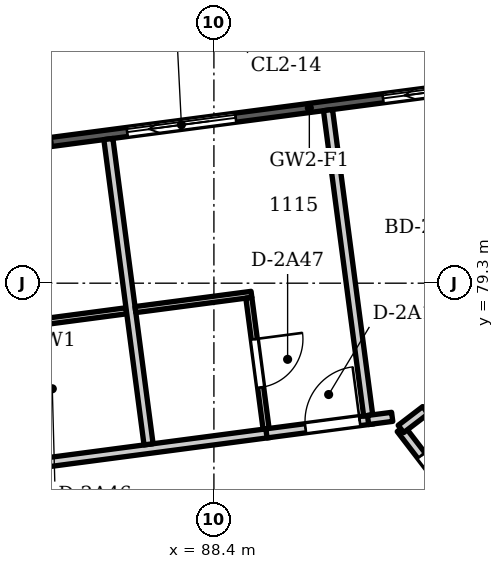
"""IFC4 building model, lengths in metres.
Left out: names, types, materials, properties, quantities, classifications, styles, units other than length and angle.
Written with IfcOpenShell. Run it as: python <this file> out.ifc"""

import sys

from ifc_helpers import new_model, si_unit, direction, frame, frame_2d, origin, place, context, subcontext, project, spatial, polyline, rectangle, outline, extrude, element, fill, save


model = new_model("IFC4")
c1 = context("Model", 3, precision=1e-05, world=origin(), true_north=direction((0.0, 1.0)))
c2 = subcontext(c1, "Body", "Model", "MODEL_VIEW")
j1 = project(units=[si_unit("LENGTHUNIT", "METRE"), si_unit("PLANEANGLEUNIT", "RADIAN")], contexts=[c1])
p1 = place(None, origin())
s1 = spatial("IfcSite", under=j1, at=p1, CompositionType="ELEMENT")
p2 = place(p1, origin())
s2 = spatial("IfcBuilding", under=s1, at=p2, CompositionType="ELEMENT")
p3 = place(p2, frame((0.0, 0.0, 50.4)))
s3 = spatial("IfcBuildingStorey", under=s2, at=p3, CompositionType="ELEMENT", Elevation=50.4)
p4 = place(p3, frame((54.142, 77.465, 0.0), z_axis=(0.0, 0.0, 1.0), x_axis=(0.991444696532, 0.130527444308, 0.0)))
e1 = element("IfcWall", 1, at=p4, inside=s3, PredefinedType="SOLIDWALL", context=c2, shape_type="SweptSolid", body=[
    extrude(outline(polyline([(0.149, 0.075), (0.149, -0.075), (47.217, -0.075), (47.217, 0.075), (0.149, 0.075)])), origin(), (0.0, 0.0, 1.0), 3.3),
])
p5 = place(p4, frame((1.222, 0.0, 0.0)))
e2 = element("IfcOpeningElement", 2, at=p5, cuts=e1, PredefinedType="OPENING", context=c2, shape_type="SweptSolid", body=[
    extrude(rectangle(XDim=1.8, YDim=2.6, at=frame_2d((0.9, 1.3))), frame((0.0, 0.085, 0.0), z_axis=(0.0, -1.0, 0.0), x_axis=(1.0, 0.0, 0.0)), (0.0, 0.0, 1.0), 0.17),
])
p6 = place(p4, frame((4.565, 0.0, 0.0)))
e3 = element("IfcOpeningElement", 3, at=p6, cuts=e1, PredefinedType="OPENING", context=c2, shape_type="SweptSolid", body=[
    extrude(rectangle(XDim=1.8, YDim=2.6, at=frame_2d((0.9, 1.3))), frame((0.0, 0.085, 0.0), z_axis=(0.0, -1.0, 0.0), x_axis=(1.0, 0.0, 0.0)), (0.0, 0.0, 1.0), 0.17),
])
p7 = place(p4, frame((8.209, 0.0, 0.0)))
e4 = element("IfcOpeningElement", 4, at=p7, cuts=e1, PredefinedType="OPENING", context=c2, shape_type="SweptSolid", body=[
    extrude(rectangle(XDim=1.8, YDim=2.6, at=frame_2d((0.9, 1.3))), frame((0.0, 0.085, 0.0), z_axis=(0.0, -1.0, 0.0), x_axis=(1.0, 0.0, 0.0)), (0.0, 0.0, 1.0), 0.17),
])
p8 = place(p4, frame((12.453, 0.0, 0.0)))
e5 = element("IfcOpeningElement", 5, at=p8, cuts=e1, PredefinedType="OPENING", context=c2, shape_type="SweptSolid", body=[
    extrude(rectangle(XDim=1.8, YDim=2.6, at=frame_2d((0.9, 1.3))), frame((0.0, 0.085, 0.0), z_axis=(0.0, -1.0, 0.0), x_axis=(1.0, 0.0, 0.0)), (0.0, 0.0, 1.0), 0.17),
])
p9 = place(p4, frame((15.496, 0.0, 0.0)))
e6 = element("IfcOpeningElement", 6, at=p9, cuts=e1, PredefinedType="OPENING", context=c2, shape_type="SweptSolid", body=[
    extrude(rectangle(XDim=1.8, YDim=2.6, at=frame_2d((0.9, 1.3))), frame((0.0, 0.085, 0.0), z_axis=(0.0, -1.0, 0.0), x_axis=(1.0, 0.0, 0.0)), (0.0, 0.0, 1.0), 0.17),
])
p10 = place(p4, frame((18.84, 0.0, 0.15)))
e7 = element("IfcOpeningElement", 7, at=p10, cuts=e1, PredefinedType="OPENING", context=c2, shape_type="SweptSolid", body=[
    extrude(rectangle(XDim=2.4, YDim=2.45, at=frame_2d((1.2, 1.225))), frame((0.0, 0.085, 0.0), z_axis=(0.0, -1.0, 0.0), x_axis=(1.0, 0.0, 0.0)), (0.0, 0.0, 1.0), 0.17),
])
p11 = place(p4, frame((22.783, 0.0, 0.0)))
e8 = element("IfcOpeningElement", 8, at=p11, cuts=e1, PredefinedType="OPENING", context=c2, shape_type="SweptSolid", body=[
    extrude(rectangle(XDim=1.8, YDim=2.6, at=frame_2d((0.9, 1.3))), frame((0.0, 0.085, 0.0), z_axis=(0.0, -1.0, 0.0), x_axis=(1.0, 0.0, 0.0)), (0.0, 0.0, 1.0), 0.17),
])
p12 = place(p4, frame((26.127, 0.0, 0.15)))
e9 = element("IfcOpeningElement", 9, at=p12, cuts=e1, PredefinedType="OPENING", context=c2, shape_type="SweptSolid", body=[
    extrude(rectangle(XDim=2.4, YDim=2.45, at=frame_2d((1.2, 1.225))), frame((0.0, 0.085, 0.0), z_axis=(0.0, -1.0, 0.0), x_axis=(1.0, 0.0, 0.0)), (0.0, 0.0, 1.0), 0.17),
])
p13 = place(p4, frame((30.071, 0.0, 0.0)))
e10 = element("IfcOpeningElement", 10, at=p13, cuts=e1, PredefinedType="OPENING", context=c2, shape_type="SweptSolid", body=[
    extrude(rectangle(XDim=1.8, YDim=2.6, at=frame_2d((0.9, 1.3))), frame((0.0, 0.085, 0.0), z_axis=(0.0, -1.0, 0.0), x_axis=(1.0, 0.0, 0.0)), (0.0, 0.0, 1.0), 0.17),
])
p14 = place(p4, frame((33.114, 0.0, 0.0)))
e11 = element("IfcOpeningElement", 11, at=p14, cuts=e1, PredefinedType="OPENING", context=c2, shape_type="SweptSolid", body=[
    extrude(rectangle(XDim=1.8, YDim=2.6, at=frame_2d((0.9, 1.3))), frame((0.0, 0.085, 0.0), z_axis=(0.0, -1.0, 0.0), x_axis=(1.0, 0.0, 0.0)), (0.0, 0.0, 1.0), 0.17),
])
p15 = place(p4, frame((37.358, 0.0, 0.0)))
e12 = element("IfcOpeningElement", 12, at=p15, cuts=e1, PredefinedType="OPENING", context=c2, shape_type="SweptSolid", body=[
    extrude(rectangle(XDim=1.8, YDim=2.6, at=frame_2d((0.9, 1.3))), frame((0.0, 0.085, 0.0), z_axis=(0.0, -1.0, 0.0), x_axis=(1.0, 0.0, 0.0)), (0.0, 0.0, 1.0), 0.17),
])
p16 = place(p4, frame((41.001, 0.0, 0.0)))
e13 = element("IfcOpeningElement", 13, at=p16, cuts=e1, PredefinedType="OPENING", context=c2, shape_type="SweptSolid", body=[
    extrude(rectangle(XDim=1.8, YDim=2.6, at=frame_2d((0.9, 1.3))), frame((0.0, 0.085, 0.0), z_axis=(0.0, -1.0, 0.0), x_axis=(1.0, 0.0, 0.0)), (0.0, 0.0, 1.0), 0.17),
])
p17 = place(p4, frame((44.345, 0.0, 0.0)))
e14 = element("IfcOpeningElement", 14, at=p17, cuts=e1, PredefinedType="OPENING", context=c2, shape_type="SweptSolid", body=[
    extrude(rectangle(XDim=1.8, YDim=2.6, at=frame_2d((0.9, 1.3))), frame((0.0, 0.085, 0.0), z_axis=(0.0, -1.0, 0.0), x_axis=(1.0, 0.0, 0.0)), (0.0, 0.0, 1.0), 0.17),
])
p18 = place(p3, frame((105.889, 77.411, 0.0), z_axis=(0.0, 0.0, 1.0), x_axis=(-0.38268395344, -0.923879316675, 0.0)))
e15 = element("IfcWall", 15, at=p18, inside=s3, PredefinedType="SOLIDWALL", context=c2, shape_type="SweptSolid", body=[
    extrude(outline(polyline([(0.149, 0.075), (0.149, -0.075), (47.217, -0.075), (47.217, 0.075), (0.149, 0.075)])), origin(), (0.0, 0.0, 1.0), 3.3),
])
p19 = place(p18, frame((1.222, 0.0, 0.0)))
e16 = element("IfcOpeningElement", 16, at=p19, cuts=e15, PredefinedType="OPENING", context=c2, shape_type="SweptSolid", body=[
    extrude(rectangle(XDim=1.8, YDim=2.6, at=frame_2d((0.9, 1.3))), frame((0.0, 0.085, 0.0), z_axis=(0.0, -1.0, 0.0), x_axis=(1.0, 0.0, 0.0)), (0.0, 0.0, 1.0), 0.17),
])
p20 = place(p18, frame((4.565, 0.0, 0.0)))
e17 = element("IfcOpeningElement", 17, at=p20, cuts=e15, PredefinedType="OPENING", context=c2, shape_type="SweptSolid", body=[
    extrude(rectangle(XDim=1.8, YDim=2.6, at=frame_2d((0.9, 1.3))), frame((0.0, 0.085, 0.0), z_axis=(0.0, -1.0, 0.0), x_axis=(1.0, 0.0, 0.0)), (0.0, 0.0, 1.0), 0.17),
])
p21 = place(p18, frame((8.209, 0.0, 0.0)))
e18 = element("IfcOpeningElement", 18, at=p21, cuts=e15, PredefinedType="OPENING", context=c2, shape_type="SweptSolid", body=[
    extrude(rectangle(XDim=1.8, YDim=2.6, at=frame_2d((0.9, 1.3))), frame((0.0, 0.085, 0.0), z_axis=(0.0, -1.0, 0.0), x_axis=(1.0, 0.0, 0.0)), (0.0, 0.0, 1.0), 0.17),
])
p22 = place(p18, frame((12.453, 0.0, 0.0)))
e19 = element("IfcOpeningElement", 19, at=p22, cuts=e15, PredefinedType="OPENING", context=c2, shape_type="SweptSolid", body=[
    extrude(rectangle(XDim=1.8, YDim=2.6, at=frame_2d((0.9, 1.3))), frame((0.0, 0.085, 0.0), z_axis=(0.0, -1.0, 0.0), x_axis=(1.0, 0.0, 0.0)), (0.0, 0.0, 1.0), 0.17),
])
p23 = place(p18, frame((15.496, 0.0, 0.0)))
e20 = element("IfcOpeningElement", 20, at=p23, cuts=e15, PredefinedType="OPENING", context=c2, shape_type="SweptSolid", body=[
    extrude(rectangle(XDim=1.8, YDim=2.6, at=frame_2d((0.9, 1.3))), frame((0.0, 0.085, 0.0), z_axis=(0.0, -1.0, 0.0), x_axis=(1.0, 0.0, 0.0)), (0.0, 0.0, 1.0), 0.17),
])
p24 = place(p18, frame((18.84, 0.0, 0.15)))
e21 = element("IfcOpeningElement", 21, at=p24, cuts=e15, PredefinedType="OPENING", context=c2, shape_type="SweptSolid", body=[
    extrude(rectangle(XDim=2.4, YDim=2.45, at=frame_2d((1.2, 1.225))), frame((0.0, 0.085, 0.0), z_axis=(0.0, -1.0, 0.0), x_axis=(1.0, 0.0, 0.0)), (0.0, 0.0, 1.0), 0.17),
])
p25 = place(p18, frame((22.783, 0.0, 0.0)))
e22 = element("IfcOpeningElement", 22, at=p25, cuts=e15, PredefinedType="OPENING", context=c2, shape_type="SweptSolid", body=[
    extrude(rectangle(XDim=1.8, YDim=2.6, at=frame_2d((0.9, 1.3))), frame((0.0, 0.085, 0.0), z_axis=(0.0, -1.0, 0.0), x_axis=(1.0, 0.0, 0.0)), (0.0, 0.0, 1.0), 0.17),
])
p26 = place(p18, frame((26.127, 0.0, 0.15)))
e23 = element("IfcOpeningElement", 23, at=p26, cuts=e15, PredefinedType="OPENING", context=c2, shape_type="SweptSolid", body=[
    extrude(rectangle(XDim=2.4, YDim=2.45, at=frame_2d((1.2, 1.225))), frame((0.0, 0.085, 0.0), z_axis=(0.0, -1.0, 0.0), x_axis=(1.0, 0.0, 0.0)), (0.0, 0.0, 1.0), 0.17),
])
p27 = place(p18, frame((30.071, 0.0, 0.0)))
e24 = element("IfcOpeningElement", 24, at=p27, cuts=e15, PredefinedType="OPENING", context=c2, shape_type="SweptSolid", body=[
    extrude(rectangle(XDim=1.8, YDim=2.6, at=frame_2d((0.9, 1.3))), frame((0.0, 0.085, 0.0), z_axis=(0.0, -1.0, 0.0), x_axis=(1.0, 0.0, 0.0)), (0.0, 0.0, 1.0), 0.17),
])
p28 = place(p18, frame((33.114, 0.0, 0.0)))
e25 = element("IfcOpeningElement", 25, at=p28, cuts=e15, PredefinedType="OPENING", context=c2, shape_type="SweptSolid", body=[
    extrude(rectangle(XDim=1.8, YDim=2.6, at=frame_2d((0.9, 1.3))), frame((0.0, 0.085, 0.0), z_axis=(0.0, -1.0, 0.0), x_axis=(1.0, 0.0, 0.0)), (0.0, 0.0, 1.0), 0.17),
])
p29 = place(p18, frame((37.358, 0.0, 0.0)))
e26 = element("IfcOpeningElement", 26, at=p29, cuts=e15, PredefinedType="OPENING", context=c2, shape_type="SweptSolid", body=[
    extrude(rectangle(XDim=1.8, YDim=2.6, at=frame_2d((0.9, 1.3))), frame((0.0, 0.085, 0.0), z_axis=(0.0, -1.0, 0.0), x_axis=(1.0, 0.0, 0.0)), (0.0, 0.0, 1.0), 0.17),
])
p30 = place(p18, frame((41.001, 0.0, 0.0)))
e27 = element("IfcOpeningElement", 27, at=p30, cuts=e15, PredefinedType="OPENING", context=c2, shape_type="SweptSolid", body=[
    extrude(rectangle(XDim=1.8, YDim=2.6, at=frame_2d((0.9, 1.3))), frame((0.0, 0.085, 0.0), z_axis=(0.0, -1.0, 0.0), x_axis=(1.0, 0.0, 0.0)), (0.0, 0.0, 1.0), 0.17),
])
p31 = place(p18, frame((44.345, 0.0, 0.0)))
e28 = element("IfcOpeningElement", 28, at=p31, cuts=e15, PredefinedType="OPENING", context=c2, shape_type="SweptSolid", body=[
    extrude(rectangle(XDim=1.8, YDim=2.6, at=frame_2d((0.9, 1.3))), frame((0.0, 0.085, 0.0), z_axis=(0.0, -1.0, 0.0), x_axis=(1.0, 0.0, 0.0)), (0.0, 0.0, 1.0), 0.17),
])
p32 = place(p3, frame((85.151, 78.607, 0.0), z_axis=(0.0, 0.0, 1.0), x_axis=(0.991411458615, 0.130779660983, 0.0)))
e29 = element("IfcWall", 29, at=p32, inside=s3, PredefinedType="PARTITIONING", context=c2, shape_type="SweptSolid", body=[
    extrude(rectangle(XDim=1.826, YDim=0.1, at=frame_2d((0.913, 0.0))), origin(), (0.0, 0.0, 1.0), 3.3),
])
p33 = place(p3, frame((85.348, 76.313, 0.0), z_axis=(0.0, 0.0, 1.0), x_axis=(0.99141734702, 0.130735014545, 0.0)))
e30 = element("IfcWall", 30, at=p33, inside=s3, PredefinedType="PARTITIONING", context=c2, shape_type="SweptSolid", body=[
    extrude(rectangle(XDim=4.008, YDim=0.15, at=frame_2d((2.004, 0.0))), origin(), (0.0, 0.0, 1.0), 3.3),
])
p34 = place(p3, frame((86.664, 81.67, 0.0), z_axis=(0.0, 0.0, 1.0), x_axis=(0.130524360114, -0.991445102573, 0.0)))
e31 = element("IfcWall", 31, at=p34, inside=s3, PredefinedType="PARTITIONING", context=c2, shape_type="SweptSolid", body=[
    extrude(rectangle(XDim=5.063, YDim=0.15, at=frame_2d((2.532, 0.0))), origin(), (0.0, 0.0, 1.0), 3.3),
])
p35 = place(p3, frame((87.109, 78.866, 0.0), z_axis=(0.0, 0.0, 1.0), x_axis=(0.991477594971, 0.130277314488, 0.0)))
e32 = element("IfcWall", 32, at=p35, inside=s3, PredefinedType="PARTITIONING", context=c2, shape_type="SweptSolid", body=[
    extrude(rectangle(XDim=1.925, YDim=0.1, at=frame_2d((0.962, 0.0))), origin(), (0.0, 0.0, 1.0), 3.3),
])
p36 = place(p3, frame((88.975, 79.06, 0.0), z_axis=(0.0, 0.0, 1.0), x_axis=(0.130457416757, -0.991453913409, 0.0)))
e33 = element("IfcWall", 33, at=p36, inside=s3, PredefinedType="PARTITIONING", context=c2, shape_type="SweptSolid", body=[
    extrude(rectangle(XDim=2.175, YDim=0.1, at=frame_2d((1.087, 0.0))), origin(), (0.0, 0.0, 1.0), 3.3),
])
p37 = place(p36, frame((0.687, 0.0, 0.0)))
e34 = element("IfcOpeningElement", 34, at=p37, cuts=e33, PredefinedType="OPENING", context=c2, shape_type="SweptSolid", body=[
    extrude(rectangle(XDim=0.8, YDim=2.1, at=frame_2d((0.4, 1.05))), frame((0.0, 0.06, 0.0), z_axis=(0.0, -1.0, 0.0), x_axis=(1.0, 0.0, 0.0)), (0.0, 0.0, 1.0), 0.12),
])
p38 = place(p3, frame((89.264, 76.83, 0.0), z_axis=(0.0, 0.0, 1.0), x_axis=(0.991460374844, 0.130408301556, 0.0)))
e35 = element("IfcWall", 35, at=p38, inside=s3, PredefinedType="PARTITIONING", context=c2, shape_type="SweptSolid", body=[
    extrude(rectangle(XDim=1.777, YDim=0.15, at=frame_2d((0.888, 0.0))), origin(), (0.0, 0.0, 1.0), 3.3),
])
p39 = place(p38, frame((0.647, 0.0, 0.0)))
e36 = element("IfcOpeningElement", 36, at=p39, cuts=e35, PredefinedType="OPENING", context=c2, shape_type="SweptSolid", body=[
    extrude(rectangle(XDim=0.9, YDim=2.1, at=frame_2d((0.45, 1.05))), frame((0.0, 0.085, 0.0), z_axis=(0.0, -1.0, 0.0), x_axis=(1.0, 0.0, 0.0)), (0.0, 0.0, 1.0), 0.17),
])
p40 = place(p3, frame((90.276, 82.146, 0.0), z_axis=(0.0, 0.0, 1.0), x_axis=(0.130553032561, -0.991441327406, 0.0)))
e37 = element("IfcWall", 37, at=p40, inside=s3, PredefinedType="PARTITIONING", context=c2, shape_type="SweptSolid", body=[
    extrude(rectangle(XDim=5.064, YDim=0.15, at=frame_2d((2.532, 0.0))), origin(), (0.0, 0.0, 1.0), 3.3),
])
p41 = place(p3, frame((90.935, 77.05, 0.0), z_axis=(0.0, 0.0, 1.0), x_axis=(0.991508240123, 0.130043876322, 0.0)))
e38 = element("IfcWall", 38, at=p41, inside=s3, PredefinedType="PARTITIONING", context=c2, shape_type="SweptSolid", body=[
    extrude(rectangle(XDim=0.4, YDim=0.15, at=frame_2d((0.2, 0.0))), origin(), (0.0, 0.0, 1.0), 3.3),
])
p42 = place(p3, frame((91.474, 76.906, 0.0), z_axis=(0.0, 0.0, 1.0), x_axis=(0.608691769464, -0.793406787081, 0.0)))
e39 = element("IfcWall", 39, at=p42, inside=s3, PredefinedType="PARTITIONING", context=c2, shape_type="SweptSolid", body=[
    extrude(rectangle(XDim=9.059, YDim=0.15, at=frame_2d((4.53, 0.0))), origin(), (0.0, 0.0, 1.0), 2.75),
])
p43 = place(p42, frame((6.606, 0.0, 0.0)))
e40 = element("IfcOpeningElement", 40, at=p43, cuts=e39, PredefinedType="OPENING", context=c2, shape_type="SweptSolid", body=[
    extrude(rectangle(XDim=1.8, YDim=2.1, at=frame_2d((0.9, 1.05))), frame((0.0, 0.085, 0.0), z_axis=(0.0, -1.0, 0.0), x_axis=(1.0, 0.0, 0.0)), (0.0, 0.0, 1.0), 0.17),
])
p44 = place(p42, frame((0.554, 0.0, 0.0)))
e41 = element("IfcOpeningElement", 41, at=p44, cuts=e39, PredefinedType="OPENING", context=c2, shape_type="SweptSolid", body=[
    extrude(rectangle(XDim=0.8, YDim=2.1, at=frame_2d((0.4, 1.05))), frame((0.0, 0.085, 0.0), z_axis=(0.0, -1.0, 0.0), x_axis=(1.0, 0.0, 0.0)), (0.0, 0.0, 1.0), 0.17),
])
p45 = place(p3, frame((91.476, 76.903, 0.0), z_axis=(0.0, 0.0, 1.0), x_axis=(0.794371473226, 0.607432269908, 0.0)))
e42 = element("IfcWall", 42, at=p45, inside=s3, PredefinedType="PARTITIONING", context=c2, shape_type="SweptSolid", body=[
    extrude(rectangle(XDim=0.508, YDim=0.15, at=frame_2d((0.254, 0.0))), origin(), (0.0, 0.0, 1.0), 3.3),
])
p46 = place(p13, origin())
e43 = element("IfcDoor", 43, at=p46, inside=s3, OperationType="SLIDING_TO_LEFT", PredefinedType="DOOR", context=c2, shape_type="SweptSolid", body=[
    extrude(rectangle(XDim=1.8, YDim=2.6, at=frame_2d((0.9, 1.3))), frame((0.0, 0.025, 0.0), z_axis=(0.0, -1.0, 0.0), x_axis=(1.0, 0.0, 0.0)), (0.0, 0.0, 1.0), 0.05),
])
fill(e10, e43)
p47 = place(p14, origin())
e44 = element("IfcDoor", 44, at=p47, inside=s3, OperationType="SLIDING_TO_LEFT", PredefinedType="DOOR", context=c2, shape_type="SweptSolid", body=[
    extrude(rectangle(XDim=1.8, YDim=2.6, at=frame_2d((0.9, 1.3))), frame((0.0, 0.025, 0.0), z_axis=(0.0, -1.0, 0.0), x_axis=(1.0, 0.0, 0.0)), (0.0, 0.0, 1.0), 0.05),
])
fill(e11, e44)
p48 = place(p15, origin())
e45 = element("IfcDoor", 45, at=p48, inside=s3, OperationType="SLIDING_TO_LEFT", PredefinedType="DOOR", context=c2, shape_type="SweptSolid", body=[
    extrude(rectangle(XDim=1.8, YDim=2.6, at=frame_2d((0.9, 1.3))), frame((0.0, 0.025, 0.0), z_axis=(0.0, -1.0, 0.0), x_axis=(1.0, 0.0, 0.0)), (0.0, 0.0, 1.0), 0.05),
])
fill(e12, e45)
p49 = place(p44, origin())
e46 = element("IfcDoor", 46, at=p49, inside=s3, OperationType="SINGLE_SWING_LEFT", PredefinedType="DOOR", context=c2, shape_type="SweptSolid", body=[
    extrude(rectangle(XDim=0.8, YDim=2.1, at=frame_2d((0.4, 1.05))), frame((0.0, 0.025, 0.0), z_axis=(0.0, -1.0, 0.0), x_axis=(1.0, 0.0, 0.0)), (0.0, 0.0, 1.0), 0.05),
])
fill(e41, e46)
p50 = place(p39, origin())
e47 = element("IfcDoor", 47, at=p50, inside=s3, OperationType="SINGLE_SWING_RIGHT", PredefinedType="DOOR", context=c2, shape_type="SweptSolid", body=[
    extrude(rectangle(XDim=0.9, YDim=2.1, at=frame_2d((0.45, 1.05))), frame((0.0, 0.025, 0.0), z_axis=(0.0, -1.0, 0.0), x_axis=(1.0, 0.0, 0.0)), (0.0, 0.0, 1.0), 0.05),
])
fill(e36, e47)
p51 = place(p37, origin())
e48 = element("IfcDoor", 48, at=p51, inside=s3, OperationType="SINGLE_SWING_LEFT", PredefinedType="DOOR", context=c2, shape_type="SweptSolid", body=[
    extrude(rectangle(XDim=0.8, YDim=2.1, at=frame_2d((0.4, 1.05))), frame((0.0, 0.025, 0.0), z_axis=(0.0, -1.0, 0.0), x_axis=(1.0, 0.0, 0.0)), (0.0, 0.0, 1.0), 0.05),
])
fill(e34, e48)
save(model, sys.argv[1])
